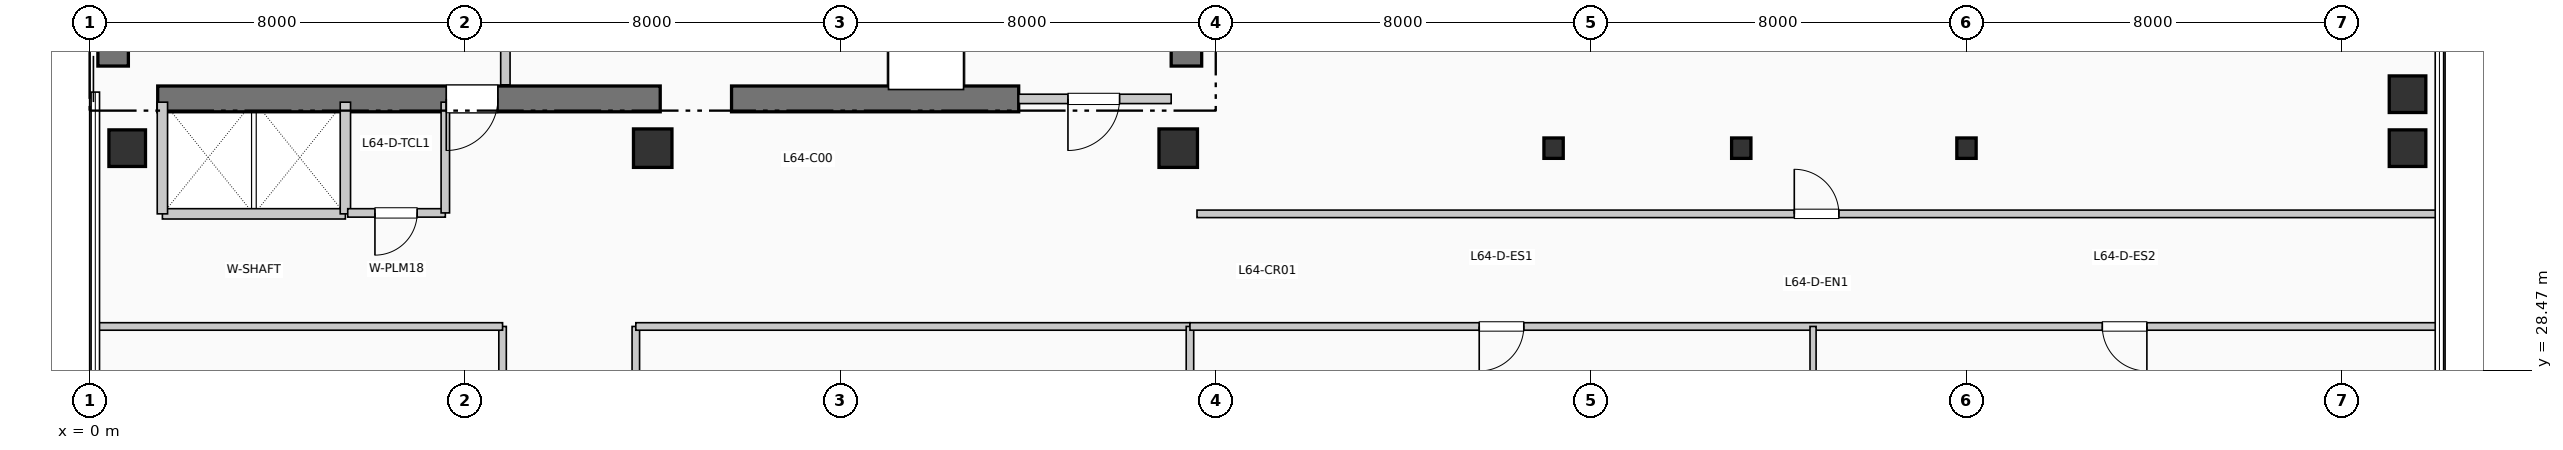
"""IFC4 building model, lengths in metres.
Left out: names, types, materials, properties, quantities, classifications, styles, units other than length and angle.
Written with IfcOpenShell. Run it as: python <this file> out.ifc"""

import sys

from ifc_helpers import new_model, si_unit, direction, frame, frame_2d, origin, origin_2d, place, context, subcontext, project, spatial, rectangle, i_section, extrude, element, fill, save


model = new_model("IFC4")
c1 = context("Model", 3, precision=1e-05, world=origin(), true_north=direction((0.0, 1.0)))
c2 = subcontext(c1, "Body", "Model", "MODEL_VIEW")
j1 = project(units=[si_unit("LENGTHUNIT", "METRE"), si_unit("PLANEANGLEUNIT", "RADIAN")], contexts=[c1])
p1 = place(None, origin())
s1 = spatial("IfcSite", under=j1, at=p1, CompositionType="ELEMENT")
p2 = place(p1, origin())
s2 = spatial("IfcBuilding", under=s1, at=p2, CompositionType="ELEMENT")
p3 = place(p2, frame((0.0, 0.0, 264.33)))
s3 = spatial("IfcBuildingStorey", under=s2, at=p3, CompositionType="ELEMENT", Elevation=264.33)
p4 = place(p3, frame((0.5, 34.95, 0.0), z_axis=(0.0, 0.0, 1.0), x_axis=(0.0, 1.0, 0.0)))
e1 = element("IfcWall", 1, at=p4, inside=s3, PredefinedType="SHEAR", context=c2, shape_type="SweptSolid", body=[
    extrude(rectangle(XDim=7.9, YDim=0.65, at=frame_2d((3.95, 0.0))), origin(), (0.0, 0.0, 1.0), 3.96),
])
p5 = place(p3, frame((23.375, 34.95, 0.0), z_axis=(0.0, 0.0, 1.0), x_axis=(0.0, 1.0, 0.0)))
e2 = element("IfcWall", 2, at=p5, inside=s3, PredefinedType="SHEAR", context=c2, shape_type="SweptSolid", body=[
    extrude(rectangle(XDim=10.64, YDim=0.65, at=frame_2d((5.32, 0.0))), origin(), (0.0, 0.0, 1.0), 3.96),
])
p6 = place(p3, frame((1.45, 34.25, 0.0), z_axis=(0.0, 0.0, 1.0), x_axis=(1.0, 0.0, 0.0)))
e3 = element("IfcWall", 3, at=p6, inside=s3, PredefinedType="SHEAR", context=c2, shape_type="SweptSolid", body=[
    extrude(rectangle(XDim=10.71, YDim=0.55, at=frame_2d((5.355, 0.0))), origin(), (0.0, 0.0, 1.0), 3.96),
])
p7 = place(p6, frame((7.25, 0.0, 0.0), z_axis=(0.0, 0.0, 1.0), x_axis=(-1.0, 0.0, 0.0)))
e4 = element("IfcOpeningElement", 4, at=p7, cuts=e3, PredefinedType="OPENING", context=c2, shape_type="SweptSolid", body=[
    extrude(rectangle(XDim=1.1, YDim=2.15, at=frame_2d((0.55, 1.075))), frame((0.0, 0.285, 0.0), z_axis=(0.0, -1.0, 0.0), x_axis=(1.0, 0.0, 0.0)), (0.0, 0.0, 1.0), 0.57),
])
p8 = place(p3, frame((13.68, 34.25, 0.0), z_axis=(0.0, 0.0, 1.0), x_axis=(1.0, 0.0, 0.0)))
e5 = element("IfcWall", 5, at=p8, inside=s3, PredefinedType="SHEAR", context=c2, shape_type="SweptSolid", body=[
    extrude(rectangle(XDim=6.12, YDim=0.55, at=frame_2d((3.06, 0.0))), origin(), (0.0, 0.0, 1.0), 3.96),
])
p9 = place(p3, frame((0.8, 33.2, 0.0), z_axis=(0.0, 0.0, 1.0), x_axis=(1.0, 0.0, 0.0)))
e6 = element("IfcColumn", 6, at=p9, inside=s3, PredefinedType="COLUMN", context=c2, shape_type="SweptSolid", body=[
    extrude(rectangle(XDim=0.78, YDim=0.78, at=origin_2d()), origin(), (0.0, 0.0, 1.0), 3.96),
])
for number, where, z_axis, x_axis in (
    (7, (12.0, 33.2, 0.0), (0.0, 0.0, 1.0), (1.0, 0.0, 0.0)),
    (8, (23.2, 33.2, 0.0), (0.0, 0.0, 1.0), (1.0, 0.0, 0.0)),
):
    element("IfcColumn", number, at=place(p3, frame(where, z_axis=z_axis, x_axis=x_axis)), inside=s3, PredefinedType="COLUMN", context=c2, shape_type="SweptSolid", body=[
        extrude(rectangle(XDim=0.82, YDim=0.82, at=origin_2d()), origin(), (0.0, 0.0, 1.0), 3.96),
    ])
for number, where, z_axis, x_axis in (
    (9, (31.2, 33.2, 0.0), (0.0, 0.0, 1.0), (1.0, 0.0, 0.0)),
    (10, (35.2, 33.2, 0.0), (0.0, 0.0, 1.0), (1.0, 0.0, 0.0)),
    (11, (40.0, 33.2, 0.0), (0.0, 0.0, 1.0), (1.0, 0.0, 0.0)),
):
    element("IfcColumn", number, at=place(p3, frame(where, z_axis=z_axis, x_axis=x_axis)), inside=s3, PredefinedType="COLUMN", context=c2, shape_type="SweptSolid", body=[
        extrude(i_section(OverallWidth=0.412, OverallDepth=0.435, WebThickness=0.027, FlangeThickness=0.043, at=origin_2d()), origin(), (0.0, 0.0, 1.0), 3.96),
    ])
for number, where, z_axis, x_axis in (
    (12, (49.4, 33.2, 0.0), (0.0, 0.0, 1.0), (1.0, 0.0, 0.0)),
    (13, (49.4, 34.35, 0.0), (0.0, 0.0, 1.0), (1.0, 0.0, 0.0)),
):
    element("IfcColumn", number, at=place(p3, frame(where, z_axis=z_axis, x_axis=x_axis)), inside=s3, PredefinedType="COLUMN", context=c2, shape_type="SweptSolid", body=[
        extrude(rectangle(XDim=0.78, YDim=0.78, at=origin_2d()), origin(), (0.0, 0.0, 1.0), 3.96),
    ])
p10 = place(p3, frame((8.86, 34.55, 0.0), z_axis=(0.0, 0.0, 1.0), x_axis=(0.0, 1.0, 0.0)))
e14 = element("IfcWall", 14, at=p10, inside=s3, PredefinedType="PARTITIONING", context=c2, shape_type="SweptSolid", body=[
    extrude(rectangle(XDim=2.5, YDim=0.2, at=frame_2d((1.25, 0.0))), origin(), (0.0, 0.0, 1.0), 3.71),
])
p11 = place(p3, frame((19.8, 34.25, 0.0), z_axis=(0.0, 0.0, 1.0), x_axis=(1.0, 0.0, 0.0)))
e15 = element("IfcWall", 15, at=p11, inside=s3, PredefinedType="PARTITIONING", context=c2, shape_type="SweptSolid", body=[
    extrude(rectangle(XDim=3.25, YDim=0.2, at=frame_2d((1.625, 0.0))), origin(), (0.0, 0.0, 1.0), 3.71),
])
p12 = place(p11, frame((2.15, 0.0, 0.0), z_axis=(0.0, 0.0, 1.0), x_axis=(-1.0, 0.0, 0.0)))
e16 = element("IfcOpeningElement", 16, at=p12, cuts=e15, PredefinedType="OPENING", context=c2, shape_type="SweptSolid", body=[
    extrude(rectangle(XDim=1.1, YDim=2.15, at=frame_2d((0.55, 1.075))), frame((0.0, 0.11, 0.0), z_axis=(0.0, -1.0, 0.0), x_axis=(1.0, 0.0, 0.0)), (0.0, 0.0, 1.0), 0.22),
])
p13 = place(p3, frame((1.55, 31.8, 0.0), z_axis=(0.0, 0.0, 1.0), x_axis=(1.0, 0.0, 0.0)))
e17 = element("IfcWall", 17, at=p13, inside=s3, PredefinedType="PARTITIONING", context=c2, shape_type="SweptSolid", body=[
    extrude(rectangle(XDim=3.9, YDim=0.22, at=frame_2d((1.95, 0.0))), origin(), (0.0, 0.0, 1.0), 3.71),
])
for number, where, z_axis, x_axis in (
    (18, (1.55, 31.8, 0.0), (0.0, 0.0, 1.0), (0.0, 1.0, 0.0)),
    (19, (5.45, 31.8, 0.0), (0.0, 0.0, 1.0), (0.0, 1.0, 0.0)),
):
    element("IfcWall", number, at=place(p3, frame(where, z_axis=z_axis, x_axis=x_axis)), inside=s3, PredefinedType="PARTITIONING", context=c2, shape_type="SweptSolid", body=[
        extrude(rectangle(XDim=2.38, YDim=0.22, at=frame_2d((1.19, 0.0))), origin(), (0.0, 0.0, 1.0), 3.71),
    ])
p14 = place(p3, frame((5.5, 31.82, 0.0), z_axis=(0.0, 0.0, 1.0), x_axis=(1.0, 0.0, 0.0)))
e20 = element("IfcWall", 20, at=p14, inside=s3, PredefinedType="PLUMBINGWALL", context=c2, shape_type="SweptSolid", body=[
    extrude(rectangle(XDim=2.08, YDim=0.18, at=frame_2d((1.04, 0.0))), origin(), (0.0, 0.0, 1.0), 3.71),
])
p15 = place(p14, frame((1.48, 0.0, 0.0), z_axis=(0.0, 0.0, 1.0), x_axis=(-1.0, 0.0, 0.0)))
e21 = element("IfcOpeningElement", 21, at=p15, cuts=e20, PredefinedType="OPENING", context=c2, shape_type="SweptSolid", body=[
    extrude(rectangle(XDim=0.9, YDim=2.1, at=frame_2d((0.45, 1.05))), frame((0.0, 0.1, 0.0), z_axis=(0.0, -1.0, 0.0), x_axis=(1.0, 0.0, 0.0)), (0.0, 0.0, 1.0), 0.2),
])
p16 = place(p3, frame((7.58, 31.82, 0.0), z_axis=(0.0, 0.0, 1.0), x_axis=(0.0, 1.0, 0.0)))
e22 = element("IfcWall", 22, at=p16, inside=s3, PredefinedType="PLUMBINGWALL", context=c2, shape_type="SweptSolid", body=[
    extrude(rectangle(XDim=2.36, YDim=0.18, at=frame_2d((1.18, 0.0))), origin(), (0.0, 0.0, 1.0), 3.71),
])
p17 = place(p3, frame((8.8, 15.0, 0.0), z_axis=(0.0, 0.0, 1.0), x_axis=(0.0, 1.0, 0.0)))
e23 = element("IfcWall", 23, at=p17, inside=s3, PredefinedType="PARTITIONING", context=c2, shape_type="SweptSolid", body=[
    extrude(rectangle(XDim=14.4, YDim=0.16, at=frame_2d((7.2, 0.0))), origin(), (0.0, 0.0, 1.0), 3.71),
])
p18 = place(p17, frame((2.059, 0.0, 0.0), z_axis=(0.0, 0.0, 1.0), x_axis=(-1.0, 0.0, 0.0)))
e24 = element("IfcOpeningElement", 24, at=p18, cuts=e23, PredefinedType="OPENING", context=c2, shape_type="SweptSolid", body=[
    extrude(rectangle(XDim=0.95, YDim=2.15, at=frame_2d((0.475, 1.075))), frame((0.0, 0.09, 0.0), z_axis=(0.0, -1.0, 0.0), x_axis=(1.0, 0.0, 0.0)), (0.0, 0.0, 1.0), 0.18),
])
p19 = place(p17, frame((5.515, 0.0, 0.0), z_axis=(0.0, 0.0, 1.0), x_axis=(-1.0, 0.0, 0.0)))
e25 = element("IfcOpeningElement", 25, at=p19, cuts=e23, PredefinedType="OPENING", context=c2, shape_type="SweptSolid", body=[
    extrude(rectangle(XDim=0.95, YDim=2.15, at=frame_2d((0.475, 1.075))), frame((0.0, 0.09, 0.0), z_axis=(0.0, -1.0, 0.0), x_axis=(1.0, 0.0, 0.0)), (0.0, 0.0, 1.0), 0.18),
])
p20 = place(p17, frame((9.331, 0.0, 0.0), z_axis=(0.0, 0.0, 1.0), x_axis=(-1.0, 0.0, 0.0)))
e26 = element("IfcOpeningElement", 26, at=p20, cuts=e23, PredefinedType="OPENING", context=c2, shape_type="SweptSolid", body=[
    extrude(rectangle(XDim=0.95, YDim=2.15, at=frame_2d((0.475, 1.075))), frame((0.0, 0.09, 0.0), z_axis=(0.0, -1.0, 0.0), x_axis=(1.0, 0.0, 0.0)), (0.0, 0.0, 1.0), 0.18),
])
p21 = place(p17, frame((13.075, 0.0, 0.0), z_axis=(0.0, 0.0, 1.0), x_axis=(-1.0, 0.0, 0.0)))
e27 = element("IfcOpeningElement", 27, at=p21, cuts=e23, PredefinedType="OPENING", context=c2, shape_type="SweptSolid", body=[
    extrude(rectangle(XDim=0.95, YDim=2.15, at=frame_2d((0.475, 1.075))), frame((0.0, 0.09, 0.0), z_axis=(0.0, -1.0, 0.0), x_axis=(1.0, 0.0, 0.0)), (0.0, 0.0, 1.0), 0.18),
])
p22 = place(p3, frame((11.64, 15.0, 0.0), z_axis=(0.0, 0.0, 1.0), x_axis=(0.0, 1.0, 0.0)))
e28 = element("IfcWall", 28, at=p22, inside=s3, PredefinedType="PARTITIONING", context=c2, shape_type="SweptSolid", body=[
    extrude(rectangle(XDim=14.4, YDim=0.16, at=frame_2d((7.2, 0.0))), origin(), (0.0, 0.0, 1.0), 3.095),
])
p23 = place(p22, frame((2.125, 0.0, 0.0)))
e29 = element("IfcOpeningElement", 29, at=p23, cuts=e28, PredefinedType="OPENING", context=c2, shape_type="SweptSolid", body=[
    extrude(rectangle(XDim=0.95, YDim=2.15, at=frame_2d((0.475, 1.075))), frame((0.0, 0.09, 0.0), z_axis=(0.0, -1.0, 0.0), x_axis=(1.0, 0.0, 0.0)), (0.0, 0.0, 1.0), 0.18),
])
p24 = place(p22, frame((10.325, 0.0, 0.0)))
e30 = element("IfcOpeningElement", 30, at=p24, cuts=e28, PredefinedType="OPENING", context=c2, shape_type="SweptSolid", body=[
    extrude(rectangle(XDim=0.95, YDim=2.15, at=frame_2d((0.475, 1.075))), frame((0.0, 0.09, 0.0), z_axis=(0.0, -1.0, 0.0), x_axis=(1.0, 0.0, 0.0)), (0.0, 0.0, 1.0), 0.18),
])
p25 = place(p3, frame((0.19, 29.4, 0.0), z_axis=(0.0, 0.0, 1.0), x_axis=(1.0, 0.0, 0.0)))
e31 = element("IfcWall", 31, at=p25, inside=s3, PredefinedType="PARTITIONING", context=c2, shape_type="SweptSolid", body=[
    extrude(rectangle(XDim=8.61, YDim=0.16, at=frame_2d((4.305, 0.0))), origin(), (0.0, 0.0, 1.0), 3.365),
])
p26 = place(p3, frame((11.64, 29.4, 0.0), z_axis=(0.0, 0.0, 1.0), x_axis=(1.0, 0.0, 0.0)))
e32 = element("IfcWall", 32, at=p26, inside=s3, PredefinedType="PARTITIONING", context=c2, shape_type="SweptSolid", body=[
    extrude(rectangle(XDim=11.81, YDim=0.16, at=frame_2d((5.905, 0.0))), origin(), (0.0, 0.0, 1.0), 3.365),
])
p27 = place(p3, frame((23.45, 6.84, 0.0), z_axis=(0.0, 0.0, 1.0), x_axis=(0.0, 1.0, 0.0)))
e33 = element("IfcWall", 33, at=p27, inside=s3, PredefinedType="PARTITIONING", context=c2, shape_type="SweptSolid", body=[
    extrude(rectangle(XDim=22.56, YDim=0.16, at=frame_2d((11.28, 0.0))), origin(), (0.0, 0.0, 1.0), 3.095),
])
p28 = place(p3, frame((23.45, 29.4, 0.0), z_axis=(0.0, 0.0, 1.0), x_axis=(1.0, 0.0, 0.0)))
e34 = element("IfcWall", 34, at=p28, inside=s3, PredefinedType="PARTITIONING", context=c2, shape_type="SweptSolid", body=[
    extrude(rectangle(XDim=26.56, YDim=0.16, at=frame_2d((13.28, 0.0))), origin(), (0.0, 0.0, 1.0), 3.365),
])
p29 = place(p28, frame((7.115, 0.0, 0.0), z_axis=(0.0, 0.0, 1.0), x_axis=(-1.0, 0.0, 0.0)))
e35 = element("IfcOpeningElement", 35, at=p29, cuts=e34, PredefinedType="OPENING", context=c2, shape_type="SweptSolid", body=[
    extrude(rectangle(XDim=0.95, YDim=2.15, at=frame_2d((0.475, 1.075))), frame((0.0, 0.09, 0.0), z_axis=(0.0, -1.0, 0.0), x_axis=(1.0, 0.0, 0.0)), (0.0, 0.0, 1.0), 0.18),
])
p30 = place(p28, frame((20.395, 0.0, 0.0), z_axis=(0.0, 0.0, 1.0), x_axis=(-1.0, 0.0, 0.0)))
e36 = element("IfcOpeningElement", 36, at=p30, cuts=e34, PredefinedType="OPENING", context=c2, shape_type="SweptSolid", body=[
    extrude(rectangle(XDim=0.95, YDim=2.15, at=frame_2d((0.475, 1.075))), frame((0.0, 0.09, 0.0), z_axis=(0.0, -1.0, 0.0), x_axis=(1.0, 0.0, 0.0)), (0.0, 0.0, 1.0), 0.18),
])
p31 = place(p3, frame((23.6, 31.8, 0.0), z_axis=(0.0, 0.0, 1.0), x_axis=(1.0, 0.0, 0.0)))
e37 = element("IfcWall", 37, at=p31, inside=s3, PredefinedType="PARTITIONING", context=c2, shape_type="SweptSolid", body=[
    extrude(rectangle(XDim=26.41, YDim=0.16, at=frame_2d((13.205, 0.0))), origin(), (0.0, 0.0, 1.0), 3.71),
])
p32 = place(p31, frame((12.73, 0.0, 0.0)))
e38 = element("IfcOpeningElement", 38, at=p32, cuts=e37, PredefinedType="OPENING", context=c2, shape_type="SweptSolid", body=[
    extrude(rectangle(XDim=0.95, YDim=2.15, at=frame_2d((0.475, 1.075))), frame((0.0, 0.09, 0.0), z_axis=(0.0, -1.0, 0.0), x_axis=(1.0, 0.0, 0.0)), (0.0, 0.0, 1.0), 0.18),
])
p33 = place(p3, frame((36.73, 22.19, 0.0), z_axis=(0.0, 0.0, 1.0), x_axis=(0.0, 1.0, 0.0)))
e39 = element("IfcWall", 39, at=p33, inside=s3, PredefinedType="PARTITIONING", context=c2, shape_type="SweptSolid", body=[
    extrude(rectangle(XDim=7.21, YDim=0.13, at=frame_2d((3.605, 0.0))), origin(), (0.0, 0.0, 1.0), 3.71),
])
p34 = place(p7, origin())
e40 = element("IfcDoor", 40, at=p34, inside=s3, OperationType="SINGLE_SWING_LEFT", PredefinedType="DOOR", context=c2, shape_type="SweptSolid", body=[
    extrude(rectangle(XDim=1.1, YDim=2.15, at=frame_2d((0.55, 1.075))), frame((0.0, 0.025, 0.0), z_axis=(0.0, -1.0, 0.0), x_axis=(1.0, 0.0, 0.0)), (0.0, 0.0, 1.0), 0.05),
])
fill(e4, e40)
p35 = place(p12, origin())
e41 = element("IfcDoor", 41, at=p35, inside=s3, OperationType="SINGLE_SWING_LEFT", PredefinedType="DOOR", context=c2, shape_type="SweptSolid", body=[
    extrude(rectangle(XDim=1.1, YDim=2.15, at=frame_2d((0.55, 1.075))), frame((0.0, 0.025, 0.0), z_axis=(0.0, -1.0, 0.0), x_axis=(1.0, 0.0, 0.0)), (0.0, 0.0, 1.0), 0.05),
])
fill(e16, e41)
p36 = place(p15, origin())
e42 = element("IfcDoor", 42, at=p36, inside=s3, OperationType="SINGLE_SWING_LEFT", PredefinedType="DOOR", context=c2, shape_type="SweptSolid", body=[
    extrude(rectangle(XDim=0.9, YDim=2.1, at=frame_2d((0.45, 1.05))), frame((0.0, 0.025, 0.0), z_axis=(0.0, -1.0, 0.0), x_axis=(1.0, 0.0, 0.0)), (0.0, 0.0, 1.0), 0.05),
])
fill(e21, e42)
p37 = place(p29, origin())
e43 = element("IfcDoor", 43, at=p37, inside=s3, OperationType="SINGLE_SWING_LEFT", PredefinedType="DOOR", context=c2, shape_type="SweptSolid", body=[
    extrude(rectangle(XDim=0.95, YDim=2.15, at=frame_2d((0.475, 1.075))), frame((0.0, 0.025, 0.0), z_axis=(0.0, -1.0, 0.0), x_axis=(1.0, 0.0, 0.0)), (0.0, 0.0, 1.0), 0.05),
])
fill(e35, e43)
p38 = place(p30, origin())
e44 = element("IfcDoor", 44, at=p38, inside=s3, OperationType="SINGLE_SWING_RIGHT", PredefinedType="DOOR", context=c2, shape_type="SweptSolid", body=[
    extrude(rectangle(XDim=0.95, YDim=2.15, at=frame_2d((0.475, 1.075))), frame((0.0, 0.025, 0.0), z_axis=(0.0, -1.0, 0.0), x_axis=(1.0, 0.0, 0.0)), (0.0, 0.0, 1.0), 0.05),
])
fill(e36, e44)
p39 = place(p32, origin())
e45 = element("IfcDoor", 45, at=p39, inside=s3, OperationType="SINGLE_SWING_LEFT", PredefinedType="DOOR", context=c2, shape_type="SweptSolid", body=[
    extrude(rectangle(XDim=0.95, YDim=2.15, at=frame_2d((0.475, 1.075))), frame((0.0, 0.025, 0.0), z_axis=(0.0, -1.0, 0.0), x_axis=(1.0, 0.0, 0.0)), (0.0, 0.0, 1.0), 0.05),
])
fill(e38, e45)
save(model, sys.argv[1])
